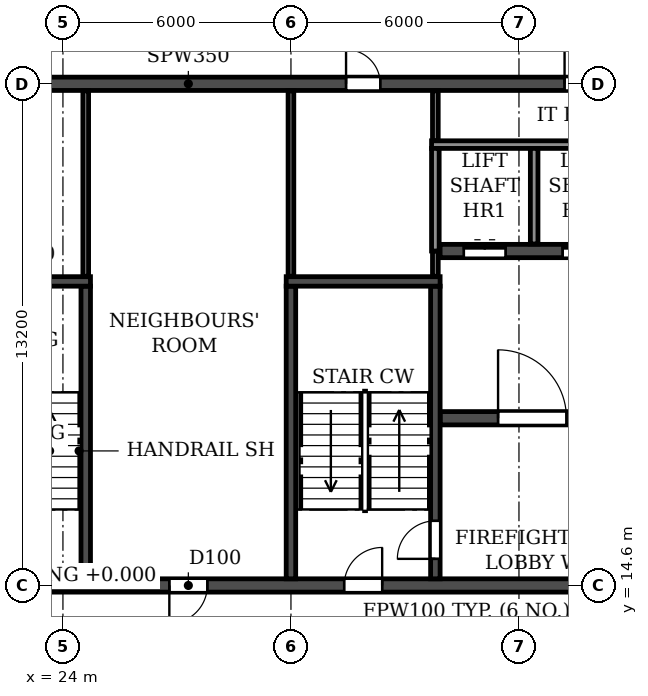
"""IFC4 building model, lengths in metres.
Left out: names, types, materials, properties, quantities, classifications, styles, units other than length and angle.
Written with IfcOpenShell. Run it as: python <this file> out.ifc"""

import sys

from ifc_helpers import new_model, si_unit, direction, frame, frame_2d, origin, place, context, subcontext, project, spatial, rectangle, extrude, element, fill, save


model = new_model("IFC4")
c1 = context("Model", 3, precision=1e-05, world=origin(), true_north=direction((0.0, 1.0)))
c2 = subcontext(c1, "Body", "Model", "MODEL_VIEW")
j1 = project(units=[si_unit("LENGTHUNIT", "METRE"), si_unit("PLANEANGLEUNIT", "RADIAN")], contexts=[c1])
p1 = place(None, origin())
s1 = spatial("IfcSite", under=j1, at=p1, CompositionType="ELEMENT")
p2 = place(p1, origin())
s2 = spatial("IfcBuilding", under=s1, at=p2, CompositionType="ELEMENT")
p3 = place(p2, frame((0.0, 0.0, 257.7)))
s3 = spatial("IfcBuildingStorey", under=s2, at=p3, CompositionType="ELEMENT", Elevation=257.7)
p4 = place(p3, frame((18.2, 14.6, 0.0), z_axis=(0.0, 0.0, 1.0), x_axis=(1.0, 0.0, 0.0)))
e1 = element("IfcWall", 1, at=p4, inside=s3, PredefinedType="SOLIDWALL", context=c2, shape_type="SweptSolid", body=[
    extrude(rectangle(XDim=65.6, YDim=0.35, at=frame_2d((32.8, 0.0))), origin(), (0.0, 0.0, 1.0), 3.0),
])
p5 = place(p4, frame((0.7, 0.0, 0.0)))
e2 = element("IfcOpeningElement", 2, at=p5, cuts=e1, PredefinedType="OPENING", context=c2, shape_type="SweptSolid", body=[
    extrude(rectangle(XDim=1.0, YDim=2.1, at=frame_2d((0.5, 1.05))), frame((0.0, 0.185, 0.0), z_axis=(0.0, -1.0, 0.0), x_axis=(1.0, 0.0, 0.0)), (0.0, 0.0, 1.0), 0.37),
])
p6 = place(p4, frame((8.6, 0.0, 0.0)))
e3 = element("IfcOpeningElement", 3, at=p6, cuts=e1, PredefinedType="OPENING", context=c2, shape_type="SweptSolid", body=[
    extrude(rectangle(XDim=1.0, YDim=2.1, at=frame_2d((0.5, 1.05))), frame((0.0, 0.185, 0.0), z_axis=(0.0, -1.0, 0.0), x_axis=(1.0, 0.0, 0.0)), (0.0, 0.0, 1.0), 0.37),
])
p7 = place(p4, frame((13.2, 0.0, 0.0)))
e4 = element("IfcOpeningElement", 4, at=p7, cuts=e1, PredefinedType="OPENING", context=c2, shape_type="SweptSolid", body=[
    extrude(rectangle(XDim=1.0, YDim=2.1, at=frame_2d((0.5, 1.05))), frame((0.0, 0.185, 0.0), z_axis=(0.0, -1.0, 0.0), x_axis=(1.0, 0.0, 0.0)), (0.0, 0.0, 1.0), 0.37),
])
p8 = place(p4, frame((24.5, 0.0, 0.0)))
e5 = element("IfcOpeningElement", 5, at=p8, cuts=e1, PredefinedType="OPENING", context=c2, shape_type="SweptSolid", body=[
    extrude(rectangle(XDim=1.0, YDim=2.1, at=frame_2d((0.5, 1.05))), frame((0.0, 0.185, 0.0), z_axis=(0.0, -1.0, 0.0), x_axis=(1.0, 0.0, 0.0)), (0.0, 0.0, 1.0), 0.37),
])
p9 = place(p4, frame((28.4, 0.0, 0.0)))
e6 = element("IfcOpeningElement", 6, at=p9, cuts=e1, PredefinedType="OPENING", context=c2, shape_type="SweptSolid", body=[
    extrude(rectangle(XDim=1.0, YDim=2.1, at=frame_2d((0.5, 1.05))), frame((0.0, 0.185, 0.0), z_axis=(0.0, -1.0, 0.0), x_axis=(1.0, 0.0, 0.0)), (0.0, 0.0, 1.0), 0.37),
])
p10 = place(p4, frame((32.3, 0.0, 0.0)))
e7 = element("IfcOpeningElement", 7, at=p10, cuts=e1, PredefinedType="OPENING", context=c2, shape_type="SweptSolid", body=[
    extrude(rectangle(XDim=1.0, YDim=2.1, at=frame_2d((0.5, 1.05))), frame((0.0, 0.185, 0.0), z_axis=(0.0, -1.0, 0.0), x_axis=(1.0, 0.0, 0.0)), (0.0, 0.0, 1.0), 0.37),
])
p11 = place(p4, frame((34.9, 0.0, 0.0)))
e8 = element("IfcOpeningElement", 8, at=p11, cuts=e1, PredefinedType="OPENING", context=c2, shape_type="SweptSolid", body=[
    extrude(rectangle(XDim=1.0, YDim=2.1, at=frame_2d((0.5, 1.05))), frame((0.0, 0.185, 0.0), z_axis=(0.0, -1.0, 0.0), x_axis=(1.0, 0.0, 0.0)), (0.0, 0.0, 1.0), 0.37),
])
p12 = place(p4, frame((38.8, 0.0, 0.0)))
e9 = element("IfcOpeningElement", 9, at=p12, cuts=e1, PredefinedType="OPENING", context=c2, shape_type="SweptSolid", body=[
    extrude(rectangle(XDim=1.0, YDim=2.1, at=frame_2d((0.5, 1.05))), frame((0.0, 0.185, 0.0), z_axis=(0.0, -1.0, 0.0), x_axis=(1.0, 0.0, 0.0)), (0.0, 0.0, 1.0), 0.37),
])
p13 = place(p4, frame((51.4, 0.0, 0.0)))
e10 = element("IfcOpeningElement", 10, at=p13, cuts=e1, PredefinedType="OPENING", context=c2, shape_type="SweptSolid", body=[
    extrude(rectangle(XDim=1.0, YDim=2.1, at=frame_2d((0.5, 1.05))), frame((0.0, 0.185, 0.0), z_axis=(0.0, -1.0, 0.0), x_axis=(1.0, 0.0, 0.0)), (0.0, 0.0, 1.0), 0.37),
])
p14 = place(p4, frame((56.0, 0.0, 0.0)))
e11 = element("IfcOpeningElement", 11, at=p14, cuts=e1, PredefinedType="OPENING", context=c2, shape_type="SweptSolid", body=[
    extrude(rectangle(XDim=1.0, YDim=2.1, at=frame_2d((0.5, 1.05))), frame((0.0, 0.185, 0.0), z_axis=(0.0, -1.0, 0.0), x_axis=(1.0, 0.0, 0.0)), (0.0, 0.0, 1.0), 0.37),
])
p15 = place(p4, frame((63.9, 0.0, 0.0)))
e12 = element("IfcOpeningElement", 12, at=p15, cuts=e1, PredefinedType="OPENING", context=c2, shape_type="SweptSolid", body=[
    extrude(rectangle(XDim=1.0, YDim=2.1, at=frame_2d((0.5, 1.05))), frame((0.0, 0.185, 0.0), z_axis=(0.0, -1.0, 0.0), x_axis=(1.0, 0.0, 0.0)), (0.0, 0.0, 1.0), 0.37),
])
p16 = place(p3, frame((18.2, 27.8, 0.0), z_axis=(0.0, 0.0, 1.0), x_axis=(1.0, 0.0, 0.0)))
e13 = element("IfcWall", 13, at=p16, inside=s3, PredefinedType="SOLIDWALL", context=c2, shape_type="SweptSolid", body=[
    extrude(rectangle(XDim=65.6, YDim=0.35, at=frame_2d((32.8, 0.0))), origin(), (0.0, 0.0, 1.0), 3.0),
])
p17 = place(p16, frame((0.7, 0.0, 0.0)))
e14 = element("IfcOpeningElement", 14, at=p17, cuts=e13, PredefinedType="OPENING", context=c2, shape_type="SweptSolid", body=[
    extrude(rectangle(XDim=1.0, YDim=2.1, at=frame_2d((0.5, 1.05))), frame((0.0, 0.185, 0.0), z_axis=(0.0, -1.0, 0.0), x_axis=(1.0, 0.0, 0.0)), (0.0, 0.0, 1.0), 0.37),
])
p18 = place(p16, frame((4.05, 0.0, 0.0)))
e15 = element("IfcOpeningElement", 15, at=p18, cuts=e13, PredefinedType="OPENING", context=c2, shape_type="SweptSolid", body=[
    extrude(rectangle(XDim=0.9, YDim=2.1, at=frame_2d((0.45, 1.05))), frame((0.0, 0.185, 0.0), z_axis=(0.0, -1.0, 0.0), x_axis=(1.0, 0.0, 0.0)), (0.0, 0.0, 1.0), 0.37),
])
p19 = place(p16, frame((13.25, 0.0, 0.0)))
e16 = element("IfcOpeningElement", 16, at=p19, cuts=e13, PredefinedType="OPENING", context=c2, shape_type="SweptSolid", body=[
    extrude(rectangle(XDim=0.9, YDim=2.1, at=frame_2d((0.45, 1.05))), frame((0.0, 0.185, 0.0), z_axis=(0.0, -1.0, 0.0), x_axis=(1.0, 0.0, 0.0)), (0.0, 0.0, 1.0), 0.37),
])
p20 = place(p16, frame((19.0, 0.0, 0.0)))
e17 = element("IfcOpeningElement", 17, at=p20, cuts=e13, PredefinedType="OPENING", context=c2, shape_type="SweptSolid", body=[
    extrude(rectangle(XDim=1.0, YDim=2.1, at=frame_2d((0.5, 1.05))), frame((0.0, 0.185, 0.0), z_axis=(0.0, -1.0, 0.0), x_axis=(1.0, 0.0, 0.0)), (0.0, 0.0, 1.0), 0.37),
])
p21 = place(p16, frame((24.2, 0.0, 0.0)))
e18 = element("IfcOpeningElement", 18, at=p21, cuts=e13, PredefinedType="OPENING", context=c2, shape_type="SweptSolid", body=[
    extrude(rectangle(XDim=1.0, YDim=2.1, at=frame_2d((0.5, 1.05))), frame((0.0, 0.185, 0.0), z_axis=(0.0, -1.0, 0.0), x_axis=(1.0, 0.0, 0.0)), (0.0, 0.0, 1.0), 0.37),
])
p22 = place(p16, frame((29.4, 0.0, 0.0)))
e19 = element("IfcOpeningElement", 19, at=p22, cuts=e13, PredefinedType="OPENING", context=c2, shape_type="SweptSolid", body=[
    extrude(rectangle(XDim=1.0, YDim=2.1, at=frame_2d((0.5, 1.05))), frame((0.0, 0.185, 0.0), z_axis=(0.0, -1.0, 0.0), x_axis=(1.0, 0.0, 0.0)), (0.0, 0.0, 1.0), 0.37),
])
p23 = place(p16, frame((32.3, 0.0, 0.0)))
e20 = element("IfcOpeningElement", 20, at=p23, cuts=e13, PredefinedType="OPENING", context=c2, shape_type="SweptSolid", body=[
    extrude(rectangle(XDim=1.0, YDim=2.1, at=frame_2d((0.5, 1.05))), frame((0.0, 0.185, 0.0), z_axis=(0.0, -1.0, 0.0), x_axis=(1.0, 0.0, 0.0)), (0.0, 0.0, 1.0), 0.37),
])
p24 = place(p16, frame((36.5, 0.0, 0.0)))
e21 = element("IfcOpeningElement", 21, at=p24, cuts=e13, PredefinedType="OPENING", context=c2, shape_type="SweptSolid", body=[
    extrude(rectangle(XDim=1.0, YDim=2.1, at=frame_2d((0.5, 1.05))), frame((0.0, 0.185, 0.0), z_axis=(0.0, -1.0, 0.0), x_axis=(1.0, 0.0, 0.0)), (0.0, 0.0, 1.0), 0.37),
])
p25 = place(p16, frame((40.4, 0.0, 0.0)))
e22 = element("IfcOpeningElement", 22, at=p25, cuts=e13, PredefinedType="OPENING", context=c2, shape_type="SweptSolid", body=[
    extrude(rectangle(XDim=1.0, YDim=2.1, at=frame_2d((0.5, 1.05))), frame((0.0, 0.185, 0.0), z_axis=(0.0, -1.0, 0.0), x_axis=(1.0, 0.0, 0.0)), (0.0, 0.0, 1.0), 0.37),
])
p26 = place(p16, frame((43.0, 0.0, 0.0)))
e23 = element("IfcOpeningElement", 23, at=p26, cuts=e13, PredefinedType="OPENING", context=c2, shape_type="SweptSolid", body=[
    extrude(rectangle(XDim=1.0, YDim=2.1, at=frame_2d((0.5, 1.05))), frame((0.0, 0.185, 0.0), z_axis=(0.0, -1.0, 0.0), x_axis=(1.0, 0.0, 0.0)), (0.0, 0.0, 1.0), 0.37),
])
p27 = place(p16, frame((46.65, 0.0, 0.0)))
e24 = element("IfcOpeningElement", 24, at=p27, cuts=e13, PredefinedType="OPENING", context=c2, shape_type="SweptSolid", body=[
    extrude(rectangle(XDim=1.5, YDim=2.1, at=frame_2d((0.75, 1.05))), frame((0.0, 0.185, 0.0), z_axis=(0.0, -1.0, 0.0), x_axis=(1.0, 0.0, 0.0)), (0.0, 0.0, 1.0), 0.37),
])
p28 = place(p16, frame((51.45, 0.0, 0.0)))
e25 = element("IfcOpeningElement", 25, at=p28, cuts=e13, PredefinedType="OPENING", context=c2, shape_type="SweptSolid", body=[
    extrude(rectangle(XDim=0.9, YDim=2.1, at=frame_2d((0.45, 1.05))), frame((0.0, 0.185, 0.0), z_axis=(0.0, -1.0, 0.0), x_axis=(1.0, 0.0, 0.0)), (0.0, 0.0, 1.0), 0.37),
])
p29 = place(p16, frame((60.65, 0.0, 0.0)))
e26 = element("IfcOpeningElement", 26, at=p29, cuts=e13, PredefinedType="OPENING", context=c2, shape_type="SweptSolid", body=[
    extrude(rectangle(XDim=0.9, YDim=2.1, at=frame_2d((0.45, 1.05))), frame((0.0, 0.185, 0.0), z_axis=(0.0, -1.0, 0.0), x_axis=(1.0, 0.0, 0.0)), (0.0, 0.0, 1.0), 0.37),
])
p30 = place(p16, frame((63.9, 0.0, 0.0)))
e27 = element("IfcOpeningElement", 27, at=p30, cuts=e13, PredefinedType="OPENING", context=c2, shape_type="SweptSolid", body=[
    extrude(rectangle(XDim=1.0, YDim=2.1, at=frame_2d((0.5, 1.05))), frame((0.0, 0.185, 0.0), z_axis=(0.0, -1.0, 0.0), x_axis=(1.0, 0.0, 0.0)), (0.0, 0.0, 1.0), 0.37),
])
p31 = place(p3, frame((33.925, 19.0, 0.0), z_axis=(0.0, 0.0, 1.0), x_axis=(1.0, 0.0, 0.0)))
e28 = element("IfcWall", 28, at=p31, inside=s3, PredefinedType="SOLIDWALL", context=c2, shape_type="SweptSolid", body=[
    extrude(rectangle(XDim=34.15, YDim=0.35, at=frame_2d((17.075, 0.0))), origin(), (0.0, 0.0, 1.0), 3.0),
])
p32 = place(p31, frame((16.175, 0.0, 0.0)))
e29 = element("IfcOpeningElement", 29, at=p32, cuts=e28, PredefinedType="OPENING", context=c2, shape_type="SweptSolid", body=[
    extrude(rectangle(XDim=1.8, YDim=2.1, at=frame_2d((0.9, 1.05))), frame((0.0, 0.185, 0.0), z_axis=(0.0, -1.0, 0.0), x_axis=(1.0, 0.0, 0.0)), (0.0, 0.0, 1.0), 0.37),
])
p33 = place(p31, frame((1.525, 0.0, 0.0)))
e30 = element("IfcOpeningElement", 30, at=p33, cuts=e28, PredefinedType="OPENING", context=c2, shape_type="SweptSolid", body=[
    extrude(rectangle(XDim=1.8, YDim=2.1, at=frame_2d((0.9, 1.05))), frame((0.0, 0.185, 0.0), z_axis=(0.0, -1.0, 0.0), x_axis=(1.0, 0.0, 0.0)), (0.0, 0.0, 1.0), 0.37),
])
p34 = place(p31, frame((30.825, 0.0, 0.0)))
e31 = element("IfcOpeningElement", 31, at=p34, cuts=e28, PredefinedType="OPENING", context=c2, shape_type="SweptSolid", body=[
    extrude(rectangle(XDim=1.8, YDim=2.1, at=frame_2d((0.9, 1.05))), frame((0.0, 0.185, 0.0), z_axis=(0.0, -1.0, 0.0), x_axis=(1.0, 0.0, 0.0)), (0.0, 0.0, 1.0), 0.37),
])
p35 = place(p3, frame((33.925, 23.4, 0.0), z_axis=(0.0, 0.0, 1.0), x_axis=(1.0, 0.0, 0.0)))
e32 = element("IfcWall", 32, at=p35, inside=s3, PredefinedType="SOLIDWALL", context=c2, shape_type="SweptSolid", body=[
    extrude(rectangle(XDim=34.15, YDim=0.35, at=frame_2d((17.075, 0.0))), origin(), (0.0, 0.0, 1.0), 3.0),
])
p36 = place(p35, frame((16.175, 0.0, 0.0)))
e33 = element("IfcOpeningElement", 33, at=p36, cuts=e32, PredefinedType="OPENING", context=c2, shape_type="SweptSolid", body=[
    extrude(rectangle(XDim=1.8, YDim=2.1, at=frame_2d((0.9, 1.05))), frame((0.0, 0.185, 0.0), z_axis=(0.0, -1.0, 0.0), x_axis=(1.0, 0.0, 0.0)), (0.0, 0.0, 1.0), 0.37),
])
p37 = place(p35, frame((0.625, 0.0, 0.0)))
e34 = element("IfcOpeningElement", 34, at=p37, cuts=e32, PredefinedType="OPENING", context=c2, shape_type="SweptSolid", body=[
    extrude(rectangle(XDim=1.1, YDim=2.1, at=frame_2d((0.55, 1.05))), frame((0.0, 0.185, 0.0), z_axis=(0.0, -1.0, 0.0), x_axis=(1.0, 0.0, 0.0)), (0.0, 0.0, 1.0), 0.37),
])
p38 = place(p35, frame((3.225, 0.0, 0.0)))
e35 = element("IfcOpeningElement", 35, at=p38, cuts=e32, PredefinedType="OPENING", context=c2, shape_type="SweptSolid", body=[
    extrude(rectangle(XDim=1.1, YDim=2.1, at=frame_2d((0.55, 1.05))), frame((0.0, 0.185, 0.0), z_axis=(0.0, -1.0, 0.0), x_axis=(1.0, 0.0, 0.0)), (0.0, 0.0, 1.0), 0.37),
])
p39 = place(p35, frame((5.825, 0.0, 0.0)))
e36 = element("IfcOpeningElement", 36, at=p39, cuts=e32, PredefinedType="OPENING", context=c2, shape_type="SweptSolid", body=[
    extrude(rectangle(XDim=1.1, YDim=2.1, at=frame_2d((0.55, 1.05))), frame((0.0, 0.185, 0.0), z_axis=(0.0, -1.0, 0.0), x_axis=(1.0, 0.0, 0.0)), (0.0, 0.0, 1.0), 0.37),
])
p40 = place(p35, frame((8.425, 0.0, 0.0)))
e37 = element("IfcOpeningElement", 37, at=p40, cuts=e32, PredefinedType="OPENING", context=c2, shape_type="SweptSolid", body=[
    extrude(rectangle(XDim=1.1, YDim=2.1, at=frame_2d((0.55, 1.05))), frame((0.0, 0.185, 0.0), z_axis=(0.0, -1.0, 0.0), x_axis=(1.0, 0.0, 0.0)), (0.0, 0.0, 1.0), 0.37),
])
p41 = place(p35, frame((11.025, 0.0, 0.0)))
e38 = element("IfcOpeningElement", 38, at=p41, cuts=e32, PredefinedType="OPENING", context=c2, shape_type="SweptSolid", body=[
    extrude(rectangle(XDim=1.1, YDim=2.1, at=frame_2d((0.55, 1.05))), frame((0.0, 0.185, 0.0), z_axis=(0.0, -1.0, 0.0), x_axis=(1.0, 0.0, 0.0)), (0.0, 0.0, 1.0), 0.37),
])
p42 = place(p35, frame((13.625, 0.0, 0.0)))
e39 = element("IfcOpeningElement", 39, at=p42, cuts=e32, PredefinedType="OPENING", context=c2, shape_type="SweptSolid", body=[
    extrude(rectangle(XDim=1.1, YDim=2.1, at=frame_2d((0.55, 1.05))), frame((0.0, 0.185, 0.0), z_axis=(0.0, -1.0, 0.0), x_axis=(1.0, 0.0, 0.0)), (0.0, 0.0, 1.0), 0.37),
])
p43 = place(p35, frame((27.225, 0.0, 0.0)))
e40 = element("IfcOpeningElement", 40, at=p43, cuts=e32, PredefinedType="OPENING", context=c2, shape_type="SweptSolid", body=[
    extrude(rectangle(XDim=1.1, YDim=2.1, at=frame_2d((0.55, 1.05))), frame((0.0, 0.185, 0.0), z_axis=(0.0, -1.0, 0.0), x_axis=(1.0, 0.0, 0.0)), (0.0, 0.0, 1.0), 0.37),
])
p44 = place(p3, frame((30.0, 14.775, 0.0), z_axis=(0.0, 0.0, 1.0), x_axis=(0.0, 1.0, 0.0)))
e41 = element("IfcWall", 41, at=p44, inside=s3, PredefinedType="SOLIDWALL", context=c2, shape_type="SweptSolid", body=[
    extrude(rectangle(XDim=7.7, YDim=0.25, at=frame_2d((3.85, 0.0))), origin(), (0.0, 0.0, 1.0), 3.0),
])
p45 = place(p3, frame((33.8, 14.775, 0.0), z_axis=(0.0, 0.0, 1.0), x_axis=(0.0, 1.0, 0.0)))
e42 = element("IfcWall", 42, at=p45, inside=s3, PredefinedType="SOLIDWALL", context=c2, shape_type="SweptSolid", body=[
    extrude(rectangle(XDim=7.7, YDim=0.25, at=frame_2d((3.85, 0.0))), origin(), (0.0, 0.0, 1.0), 3.0),
])
p46 = place(p45, frame((0.525, 0.0, 0.0)))
e43 = element("IfcOpeningElement", 43, at=p46, cuts=e42, PredefinedType="OPENING", context=c2, shape_type="SweptSolid", body=[
    extrude(rectangle(XDim=1.0, YDim=2.1, at=frame_2d((0.5, 1.05))), frame((0.0, 0.135, 0.0), z_axis=(0.0, -1.0, 0.0), x_axis=(1.0, 0.0, 0.0)), (0.0, 0.0, 1.0), 0.27),
])
p47 = place(p3, frame((29.875, 22.6, 0.0), z_axis=(0.0, 0.0, 1.0), x_axis=(1.0, 0.0, 0.0)))
e44 = element("IfcWall", 44, at=p47, inside=s3, PredefinedType="SOLIDWALL", context=c2, shape_type="SweptSolid", body=[
    extrude(rectangle(XDim=4.05, YDim=0.25, at=frame_2d((2.025, 0.0))), origin(), (0.0, 0.0, 1.0), 3.0),
])
p48 = place(p3, frame((24.6, 14.775, 0.0), z_axis=(0.0, 0.0, 1.0), x_axis=(0.0, 1.0, 0.0)))
e45 = element("IfcWall", 45, at=p48, inside=s3, PredefinedType="SOLIDWALL", context=c2, shape_type="SweptSolid", body=[
    extrude(rectangle(XDim=7.7, YDim=0.25, at=frame_2d((3.85, 0.0))), origin(), (0.0, 0.0, 1.0), 3.0),
])
p49 = place(p3, frame((20.675, 22.6, 0.0), z_axis=(0.0, 0.0, 1.0), x_axis=(1.0, 0.0, 0.0)))
e46 = element("IfcWall", 46, at=p49, inside=s3, PredefinedType="SOLIDWALL", context=c2, shape_type="SweptSolid", body=[
    extrude(rectangle(XDim=4.05, YDim=0.25, at=frame_2d((2.025, 0.0))), origin(), (0.0, 0.0, 1.0), 3.0),
])
for number, where, z_axis, x_axis in (
    (47, (24.6, 22.735, 0.0), (0.0, 0.0, 1.0), (0.0, 1.0, 0.0)),
    (48, (30.0, 22.735, 0.0), (0.0, 0.0, 1.0), (0.0, 1.0, 0.0)),
):
    element("IfcWall", number, at=place(p3, frame(where, z_axis=z_axis, x_axis=x_axis)), inside=s3, PredefinedType="PARTITIONING", context=c2, shape_type="SweptSolid", body=[
        extrude(rectangle(XDim=4.88, YDim=0.15, at=frame_2d((2.44, 0.0))), origin(), (0.0, 0.0, 1.0), 3.0),
    ])
p50 = place(p3, frame((33.8, 22.735, 0.0), z_axis=(0.0, 0.0, 1.0), x_axis=(0.0, 1.0, 0.0)))
e49 = element("IfcWall", 49, at=p50, inside=s3, PredefinedType="PARTITIONING", context=c2, shape_type="SweptSolid", body=[
    extrude(rectangle(XDim=0.665, YDim=0.15, at=frame_2d((0.333, 0.0))), origin(), (0.0, 0.0, 1.0), 3.0),
])
p51 = place(p3, frame((33.8, 26.3, 0.0), z_axis=(0.0, 0.0, 1.0), x_axis=(0.0, 1.0, 0.0)))
e50 = element("IfcWall", 50, at=p51, inside=s3, PredefinedType="PARTITIONING", context=c2, shape_type="SweptSolid", body=[
    extrude(rectangle(XDim=1.315, YDim=0.15, at=frame_2d((0.657, 0.0))), origin(), (0.0, 0.0, 1.0), 3.0),
])
p52 = place(p3, frame((33.7, 26.2, 0.0), z_axis=(0.0, 0.0, 1.0), x_axis=(1.0, 0.0, 0.0)))
e51 = element("IfcWall", 51, at=p52, inside=s3, PredefinedType="PARTITIONING", context=c2, shape_type="SweptSolid", body=[
    extrude(rectangle(XDim=10.4, YDim=0.2, at=frame_2d((5.2, 0.0))), origin(), (0.0, 0.0, 1.0), 3.0),
])
p53 = place(p3, frame((33.8, 23.4, 0.0), z_axis=(0.0, 0.0, 1.0), x_axis=(0.0, 1.0, 0.0)))
e52 = element("IfcWall", 52, at=p53, inside=s3, PredefinedType="PARTITIONING", context=c2, shape_type="SweptSolid", body=[
    extrude(rectangle(XDim=2.7, YDim=0.2, at=frame_2d((1.35, 0.0))), origin(), (0.0, 0.0, 1.0), 3.0),
])
p54 = place(p3, frame((36.4, 23.585, 0.0), z_axis=(0.0, 0.0, 1.0), x_axis=(0.0, 1.0, 0.0)))
e53 = element("IfcWall", 53, at=p54, inside=s3, PredefinedType="PARTITIONING", context=c2, shape_type="SweptSolid", body=[
    extrude(rectangle(XDim=2.515, YDim=0.2, at=frame_2d((1.258, 0.0))), origin(), (0.0, 0.0, 1.0), 3.0),
])
p55 = place(p19, origin())
e54 = element("IfcDoor", 54, at=p55, inside=s3, OperationType="SINGLE_SWING_LEFT", PredefinedType="DOOR", context=c2, shape_type="SweptSolid", body=[
    extrude(rectangle(XDim=0.9, YDim=2.1, at=frame_2d((0.45, 1.05))), frame((0.0, 0.025, 0.0), z_axis=(0.0, -1.0, 0.0), x_axis=(1.0, 0.0, 0.0)), (0.0, 0.0, 1.0), 0.05),
])
fill(e16, e54)
p56 = place(p20, origin())
e55 = element("IfcDoor", 55, at=p56, inside=s3, OperationType="SINGLE_SWING_LEFT", PredefinedType="DOOR", context=c2, shape_type="SweptSolid", body=[
    extrude(rectangle(XDim=1.0, YDim=2.1, at=frame_2d((0.5, 1.05))), frame((0.0, 0.025, 0.0), z_axis=(0.0, -1.0, 0.0), x_axis=(1.0, 0.0, 0.0)), (0.0, 0.0, 1.0), 0.05),
])
fill(e17, e55)
p57 = place(p6, frame((1.0, 0.0, 0.0), z_axis=(0.0, 0.0, 1.0), x_axis=(-1.0, 0.0, 0.0)))
e56 = element("IfcDoor", 56, at=p57, inside=s3, OperationType="SINGLE_SWING_RIGHT", PredefinedType="DOOR", context=c2, shape_type="SweptSolid", body=[
    extrude(rectangle(XDim=1.0, YDim=2.1, at=frame_2d((0.5, 1.05))), frame((0.0, 0.025, 0.0), z_axis=(0.0, -1.0, 0.0), x_axis=(1.0, 0.0, 0.0)), (0.0, 0.0, 1.0), 0.05),
])
fill(e3, e56)
p58 = place(p7, origin())
e57 = element("IfcDoor", 57, at=p58, inside=s3, OperationType="SINGLE_SWING_RIGHT", PredefinedType="DOOR", context=c2, shape_type="SweptSolid", body=[
    extrude(rectangle(XDim=1.0, YDim=2.1, at=frame_2d((0.5, 1.05))), frame((0.0, 0.025, 0.0), z_axis=(0.0, -1.0, 0.0), x_axis=(1.0, 0.0, 0.0)), (0.0, 0.0, 1.0), 0.05),
])
fill(e4, e57)
p59 = place(p46, origin())
e58 = element("IfcDoor", 58, at=p59, inside=s3, OperationType="SINGLE_SWING_LEFT", PredefinedType="DOOR", context=c2, shape_type="SweptSolid", body=[
    extrude(rectangle(XDim=1.0, YDim=2.1, at=frame_2d((0.5, 1.05))), frame((0.0, 0.025, 0.0), z_axis=(0.0, -1.0, 0.0), x_axis=(1.0, 0.0, 0.0)), (0.0, 0.0, 1.0), 0.05),
])
fill(e43, e58)
p60 = place(p37, origin())
e59 = element("IfcDoor", 59, at=p60, inside=s3, OperationType="DOUBLE_DOOR_SLIDING", PredefinedType="DOOR", context=c2, shape_type="SweptSolid", body=[
    extrude(rectangle(XDim=1.1, YDim=2.1, at=frame_2d((0.55, 1.05))), frame((0.0, 0.025, 0.0), z_axis=(0.0, -1.0, 0.0), x_axis=(1.0, 0.0, 0.0)), (0.0, 0.0, 1.0), 0.05),
])
fill(e34, e59)
p61 = place(p33, origin())
e60 = element("IfcDoor", 60, at=p61, inside=s3, OperationType="DOUBLE_DOOR_SINGLE_SWING", PredefinedType="DOOR", context=c2, shape_type="SweptSolid", body=[
    extrude(rectangle(XDim=1.8, YDim=2.1, at=frame_2d((0.9, 1.05))), frame((0.0, 0.025, 0.0), z_axis=(0.0, -1.0, 0.0), x_axis=(1.0, 0.0, 0.0)), (0.0, 0.0, 1.0), 0.05),
])
fill(e30, e60)
p62 = place(p38, origin())
e61 = element("IfcDoor", 61, at=p62, inside=s3, OperationType="DOUBLE_DOOR_SLIDING", PredefinedType="DOOR", context=c2, shape_type="SweptSolid", body=[
    extrude(rectangle(XDim=1.1, YDim=2.1, at=frame_2d((0.55, 1.05))), frame((0.0, 0.025, 0.0), z_axis=(0.0, -1.0, 0.0), x_axis=(1.0, 0.0, 0.0)), (0.0, 0.0, 1.0), 0.05),
])
fill(e35, e61)
save(model, sys.argv[1])
